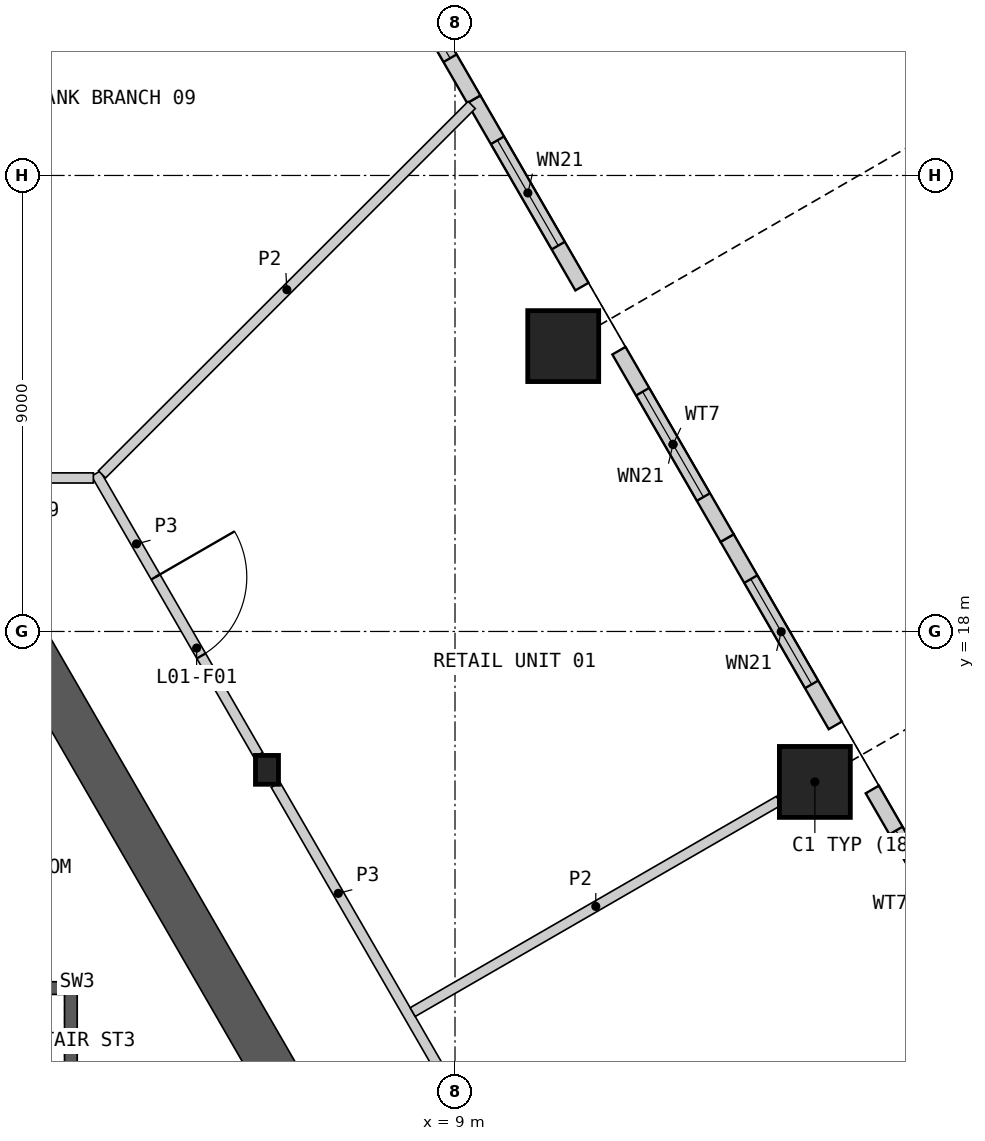
"""IFC4 building model, lengths in metres.
Left out: names, types, materials, properties, quantities, classifications, styles, units other than length and angle.
Written with IfcOpenShell. Run it as: python <this file> out.ifc"""

import sys

from ifc_helpers import new_model, si_unit, direction, frame, frame_2d, origin, origin_2d, place, context, subcontext, project, spatial, polyline, rectangle, hollow_rectangle, i_section, outline, extrude, element, fill, save


model = new_model("IFC4")
c1 = context("Model", 3, precision=1e-05, world=origin(), true_north=direction((0.0, 1.0)))
c2 = subcontext(c1, "Body", "Model", "MODEL_VIEW")
j1 = project(units=[si_unit("LENGTHUNIT", "METRE"), si_unit("PLANEANGLEUNIT", "RADIAN")], contexts=[c1])
p1 = place(None, origin())
s1 = spatial("IfcSite", under=j1, at=p1, CompositionType="ELEMENT")
p2 = place(p1, origin())
s2 = spatial("IfcBuilding", under=s1, at=p2, CompositionType="ELEMENT")
p3 = place(p2, frame((0.0, 0.0, 10.0)))
s3 = spatial("IfcBuildingStorey", under=s2, at=p3, CompositionType="ELEMENT", Elevation=10.0)
for number, where, z_axis, x_axis in (
    (1, (16.102, 15.031, 0.0), (0.0, 0.0, 1.0), (1.0, 0.0, 0.0)),
    (2, (11.136, 23.632, 0.0), (0.0, 0.0, 1.0), (1.0, 0.0, 0.0)),
):
    element("IfcColumn", number, at=place(p3, frame(where, z_axis=z_axis, x_axis=x_axis)), inside=s3, PredefinedType="COLUMN", context=c2, shape_type="SweptSolid", body=[
        extrude(hollow_rectangle(XDim=1.4, YDim=1.4, WallThickness=0.1, at=origin_2d()), origin(), (0.0, 0.0, 1.0), 5.5),
    ])
p4 = place(p3, frame((5.289, 15.269, 0.0), z_axis=(0.0, 0.0, 1.0), x_axis=(1.0, 0.0, 0.0)))
e3 = element("IfcColumn", 3, at=p4, inside=s3, PredefinedType="COLUMN", context=c2, shape_type="SweptSolid", body=[
    extrude(i_section(OverallWidth=0.454, OverallDepth=0.57, WebThickness=0.078, FlangeThickness=0.125, at=origin_2d()), origin(), (0.0, 0.0, 1.0), 5.5),
])
p5 = place(p3, frame((19.37, 11.183, 0.0), z_axis=(0.0, 0.0, 1.0), x_axis=(-0.499994660107, 0.866028486751, 0.0)))
e4 = element("IfcWall", 4, at=p5, inside=s3, PredefinedType="SOLIDWALL", context=c2, shape_type="SweptSolid", body=[
    extrude(rectangle(XDim=4.27, YDim=0.3, at=frame_2d((2.135, 0.0))), origin(), (0.0, 0.0, 1.0), 5.05),
])
p6 = place(p5, frame((0.935, 0.0, 0.9)))
e5 = element("IfcOpeningElement", 5, at=p6, cuts=e4, PredefinedType="OPENING", context=c2, shape_type="SweptSolid", body=[
    extrude(rectangle(XDim=2.4, YDim=3.0, at=frame_2d((1.2, 1.5))), frame((0.0, 0.16, 0.0), z_axis=(0.0, -1.0, 0.0), x_axis=(1.0, 0.0, 0.0)), (0.0, 0.0, 1.0), 0.32),
])
p7 = place(p3, frame((16.505, 16.146, 0.0), z_axis=(0.0, 0.0, 1.0), x_axis=(-0.500019418418, 0.866014192265, 0.0)))
e6 = element("IfcWall", 6, at=p7, inside=s3, PredefinedType="SOLIDWALL", context=c2, shape_type="SweptSolid", body=[
    extrude(rectangle(XDim=4.27, YDim=0.3, at=frame_2d((2.135, 0.0))), origin(), (0.0, 0.0, 1.0), 5.05),
])
p8 = place(p7, frame((0.935, 0.0, 0.9)))
e7 = element("IfcOpeningElement", 7, at=p8, cuts=e6, PredefinedType="OPENING", context=c2, shape_type="SweptSolid", body=[
    extrude(rectangle(XDim=2.4, YDim=3.0, at=frame_2d((1.2, 1.5))), frame((0.0, 0.16, 0.0), z_axis=(0.0, -1.0, 0.0), x_axis=(1.0, 0.0, 0.0)), (0.0, 0.0, 1.0), 0.32),
])
p9 = place(p3, frame((14.37, 19.844, 0.0), z_axis=(0.0, 0.0, 1.0), x_axis=(-0.499994660107, 0.866028486751, 0.0)))
e8 = element("IfcWall", 8, at=p9, inside=s3, PredefinedType="SOLIDWALL", context=c2, shape_type="SweptSolid", body=[
    extrude(rectangle(XDim=4.27, YDim=0.3, at=frame_2d((2.135, 0.0))), origin(), (0.0, 0.0, 1.0), 5.05),
])
p10 = place(p9, frame((0.935, 0.0, 0.9)))
e9 = element("IfcOpeningElement", 9, at=p10, cuts=e8, PredefinedType="OPENING", context=c2, shape_type="SweptSolid", body=[
    extrude(rectangle(XDim=2.4, YDim=3.0, at=frame_2d((1.2, 1.5))), frame((0.0, 0.16, 0.0), z_axis=(0.0, -1.0, 0.0), x_axis=(1.0, 0.0, 0.0)), (0.0, 0.0, 1.0), 0.32),
])
p11 = place(p3, frame((11.505, 24.806, 0.0), z_axis=(0.0, 0.0, 1.0), x_axis=(-0.499994660107, 0.866028486751, 0.0)))
e10 = element("IfcWall", 10, at=p11, inside=s3, PredefinedType="SOLIDWALL", context=c2, shape_type="SweptSolid", body=[
    extrude(rectangle(XDim=4.27, YDim=0.3, at=frame_2d((2.135, 0.0))), origin(), (0.0, 0.0, 1.0), 5.05),
])
p12 = place(p11, frame((0.935, 0.0, 0.9)))
e11 = element("IfcOpeningElement", 11, at=p12, cuts=e10, PredefinedType="OPENING", context=c2, shape_type="SweptSolid", body=[
    extrude(rectangle(XDim=2.4, YDim=3.0, at=frame_2d((1.2, 1.5))), frame((0.0, 0.16, 0.0), z_axis=(0.0, -1.0, 0.0), x_axis=(1.0, 0.0, 0.0)), (0.0, 0.0, 1.0), 0.32),
])
p13 = place(p3, frame((9.37, 28.504, 0.0), z_axis=(0.0, 0.0, 1.0), x_axis=(-0.500019418418, 0.866014192265, 0.0)))
e12 = element("IfcWall", 12, at=p13, inside=s3, PredefinedType="SOLIDWALL", context=c2, shape_type="SweptSolid", body=[
    extrude(rectangle(XDim=4.27, YDim=0.3, at=frame_2d((2.135, 0.0))), origin(), (0.0, 0.0, 1.0), 5.05),
])
p14 = place(p13, frame((0.935, 0.0, 0.9)))
e13 = element("IfcOpeningElement", 13, at=p14, cuts=e12, PredefinedType="OPENING", context=c2, shape_type="SweptSolid", body=[
    extrude(rectangle(XDim=2.4, YDim=3.0, at=frame_2d((1.2, 1.5))), frame((0.0, 0.16, 0.0), z_axis=(0.0, -1.0, 0.0), x_axis=(1.0, 0.0, 0.0)), (0.0, 0.0, 1.0), 0.32),
])
p15 = place(p3, origin())
e14 = element("IfcWall", 14, at=p15, inside=s3, PredefinedType="SHEAR", context=c2, shape_type="SweptSolid", body=[
    extrude(outline(polyline([(1.544, 5.237), (1.544, 11.087), (1.294, 10.837), (1.294, 5.237), (1.544, 5.237)])), origin(), (0.0, 0.0, 1.0), 5.05),
])
p16 = place(p3, origin())
e15 = element("IfcWall", 15, at=p16, inside=s3, PredefinedType="SHEAR", context=c2, shape_type="SweptSolid", body=[
    extrude(outline(polyline([(1.544, 11.087), (-1.544, 11.087), (-1.294, 10.837), (1.294, 10.837), (1.544, 11.087)])), origin(), (0.0, 0.0, 1.0), 5.05),
])
p17 = place(p3, frame((8.16, 4.596, 0.0), z_axis=(0.0, 0.0, 1.0), x_axis=(-0.500009830349, 0.866019728156, 0.0)))
e16 = element("IfcWall", 16, at=p17, inside=s3, PredefinedType="SHEAR", context=c2, shape_type="SweptSolid", body=[
    extrude(rectangle(XDim=15.541, YDim=0.9, at=frame_2d((7.771, 0.0))), origin(), (0.0, 0.0, 1.0), 5.05),
])
p18 = place(p3, frame((5.459, 14.974, 0.0), z_axis=(0.0, 0.0, 1.0), x_axis=(0.499985793049, -0.866033606016, 0.0)))
e17 = element("IfcWall", 17, at=p18, inside=s3, PredefinedType="PARTITIONING", context=c2, shape_type="SweptSolid", body=[
    extrude(rectangle(XDim=9.898, YDim=0.2, at=frame_2d((4.949, 0.0))), origin(), (0.0, 0.0, 1.0), 5.05),
])
p19 = place(p3, frame((1.913, 21.116, 0.0), z_axis=(0.0, 0.0, 1.0), x_axis=(0.500004801114, -0.866022631842, 0.0)))
e18 = element("IfcWall", 18, at=p19, inside=s3, PredefinedType="PARTITIONING", context=c2, shape_type="SweptSolid", body=[
    extrude(rectangle(XDim=6.412, YDim=0.2, at=frame_2d((3.206, 0.0))), origin(), (0.0, 0.0, 1.0), 5.05),
])
p20 = place(p19, frame((2.356, 0.0, 0.0)))
e19 = element("IfcOpeningElement", 19, at=p20, cuts=e18, PredefinedType="OPENING", context=c2, shape_type="SweptSolid", body=[
    extrude(rectangle(XDim=1.8, YDim=2.1, at=frame_2d((0.9, 1.05))), frame((0.0, 0.11, 0.0), z_axis=(0.0, -1.0, 0.0), x_axis=(1.0, 0.0, 0.0)), (0.0, 0.0, 1.0), 0.22),
])
p21 = place(p3, frame((-1.863, 21.03, 0.0), z_axis=(0.0, 0.0, 1.0), x_axis=(1.0, 0.0, 0.0)))
e20 = element("IfcWall", 20, at=p21, inside=s3, PredefinedType="PARTITIONING", context=c2, shape_type="SweptSolid", body=[
    extrude(rectangle(XDim=3.726, YDim=0.2, at=frame_2d((1.863, 0.0))), origin(), (0.0, 0.0, 1.0), 5.05),
])
p22 = place(p21, frame((0.963, 0.0, 0.0)))
e21 = element("IfcOpeningElement", 21, at=p22, cuts=e20, PredefinedType="OPENING", context=c2, shape_type="SweptSolid", body=[
    extrude(rectangle(XDim=1.8, YDim=2.1, at=frame_2d((0.9, 1.05))), frame((0.0, 0.11, 0.0), z_axis=(0.0, -1.0, 0.0), x_axis=(1.0, 0.0, 0.0)), (0.0, 0.0, 1.0), 0.22),
])
p23 = place(p3, frame((2.034, 21.101, 0.0), z_axis=(0.0, 0.0, 1.0), x_axis=(0.707402604593, 0.706810833968, 0.0)))
e22 = element("IfcWall", 22, at=p23, inside=s3, PredefinedType="PARTITIONING", context=c2, shape_type="SweptSolid", body=[
    extrude(rectangle(XDim=10.314, YDim=0.2, at=frame_2d((5.157, 0.0))), origin(), (0.0, 0.0, 1.0), 5.05),
])
p24 = place(p3, frame((8.165, 10.488, 0.0), z_axis=(0.0, 0.0, 1.0), x_axis=(0.866027244746, 0.499996811348, 0.0)))
e23 = element("IfcWall", 23, at=p24, inside=s3, PredefinedType="PARTITIONING", context=c2, shape_type="SweptSolid", body=[
    extrude(rectangle(XDim=8.345, YDim=0.2, at=frame_2d((4.172, 0.0))), origin(), (0.0, 0.0, 1.0), 5.05),
])
p25 = place(p6, origin())
e24 = element("IfcWindow", 24, at=p25, inside=s3, PartitioningType="SINGLE_PANEL", PredefinedType="WINDOW", context=c2, shape_type="SweptSolid", body=[
    extrude(rectangle(XDim=2.4, YDim=3.0, at=frame_2d((1.2, 1.5))), frame((0.0, 0.03, 0.0), z_axis=(0.0, -1.0, 0.0), x_axis=(1.0, 0.0, 0.0)), (0.0, 0.0, 1.0), 0.06),
])
fill(e5, e24)
p26 = place(p8, origin())
e25 = element("IfcWindow", 25, at=p26, inside=s3, PartitioningType="SINGLE_PANEL", PredefinedType="WINDOW", context=c2, shape_type="SweptSolid", body=[
    extrude(rectangle(XDim=2.4, YDim=3.0, at=frame_2d((1.2, 1.5))), frame((0.0, 0.03, 0.0), z_axis=(0.0, -1.0, 0.0), x_axis=(1.0, 0.0, 0.0)), (0.0, 0.0, 1.0), 0.06),
])
fill(e7, e25)
p27 = place(p10, origin())
e26 = element("IfcWindow", 26, at=p27, inside=s3, PartitioningType="SINGLE_PANEL", PredefinedType="WINDOW", context=c2, shape_type="SweptSolid", body=[
    extrude(rectangle(XDim=2.4, YDim=3.0, at=frame_2d((1.2, 1.5))), frame((0.0, 0.03, 0.0), z_axis=(0.0, -1.0, 0.0), x_axis=(1.0, 0.0, 0.0)), (0.0, 0.0, 1.0), 0.06),
])
fill(e9, e26)
p28 = place(p12, origin())
e27 = element("IfcWindow", 27, at=p28, inside=s3, PartitioningType="SINGLE_PANEL", PredefinedType="WINDOW", context=c2, shape_type="SweptSolid", body=[
    extrude(rectangle(XDim=2.4, YDim=3.0, at=frame_2d((1.2, 1.5))), frame((0.0, 0.03, 0.0), z_axis=(0.0, -1.0, 0.0), x_axis=(1.0, 0.0, 0.0)), (0.0, 0.0, 1.0), 0.06),
])
fill(e11, e27)
p29 = place(p14, origin())
e28 = element("IfcWindow", 28, at=p29, inside=s3, PartitioningType="SINGLE_PANEL", PredefinedType="WINDOW", context=c2, shape_type="SweptSolid", body=[
    extrude(rectangle(XDim=2.4, YDim=3.0, at=frame_2d((1.2, 1.5))), frame((0.0, 0.03, 0.0), z_axis=(0.0, -1.0, 0.0), x_axis=(1.0, 0.0, 0.0)), (0.0, 0.0, 1.0), 0.06),
])
fill(e13, e28)
p30 = place(p20, origin())
e29 = element("IfcDoor", 29, at=p30, inside=s3, OperationType="DOUBLE_DOOR_SINGLE_SWING", PredefinedType="DOOR", context=c2, shape_type="SweptSolid", body=[
    extrude(rectangle(XDim=1.8, YDim=2.1, at=frame_2d((0.9, 1.05))), frame((0.0, 0.025, 0.0), z_axis=(0.0, -1.0, 0.0), x_axis=(1.0, 0.0, 0.0)), (0.0, 0.0, 1.0), 0.05),
])
fill(e19, e29)
save(model, sys.argv[1])
